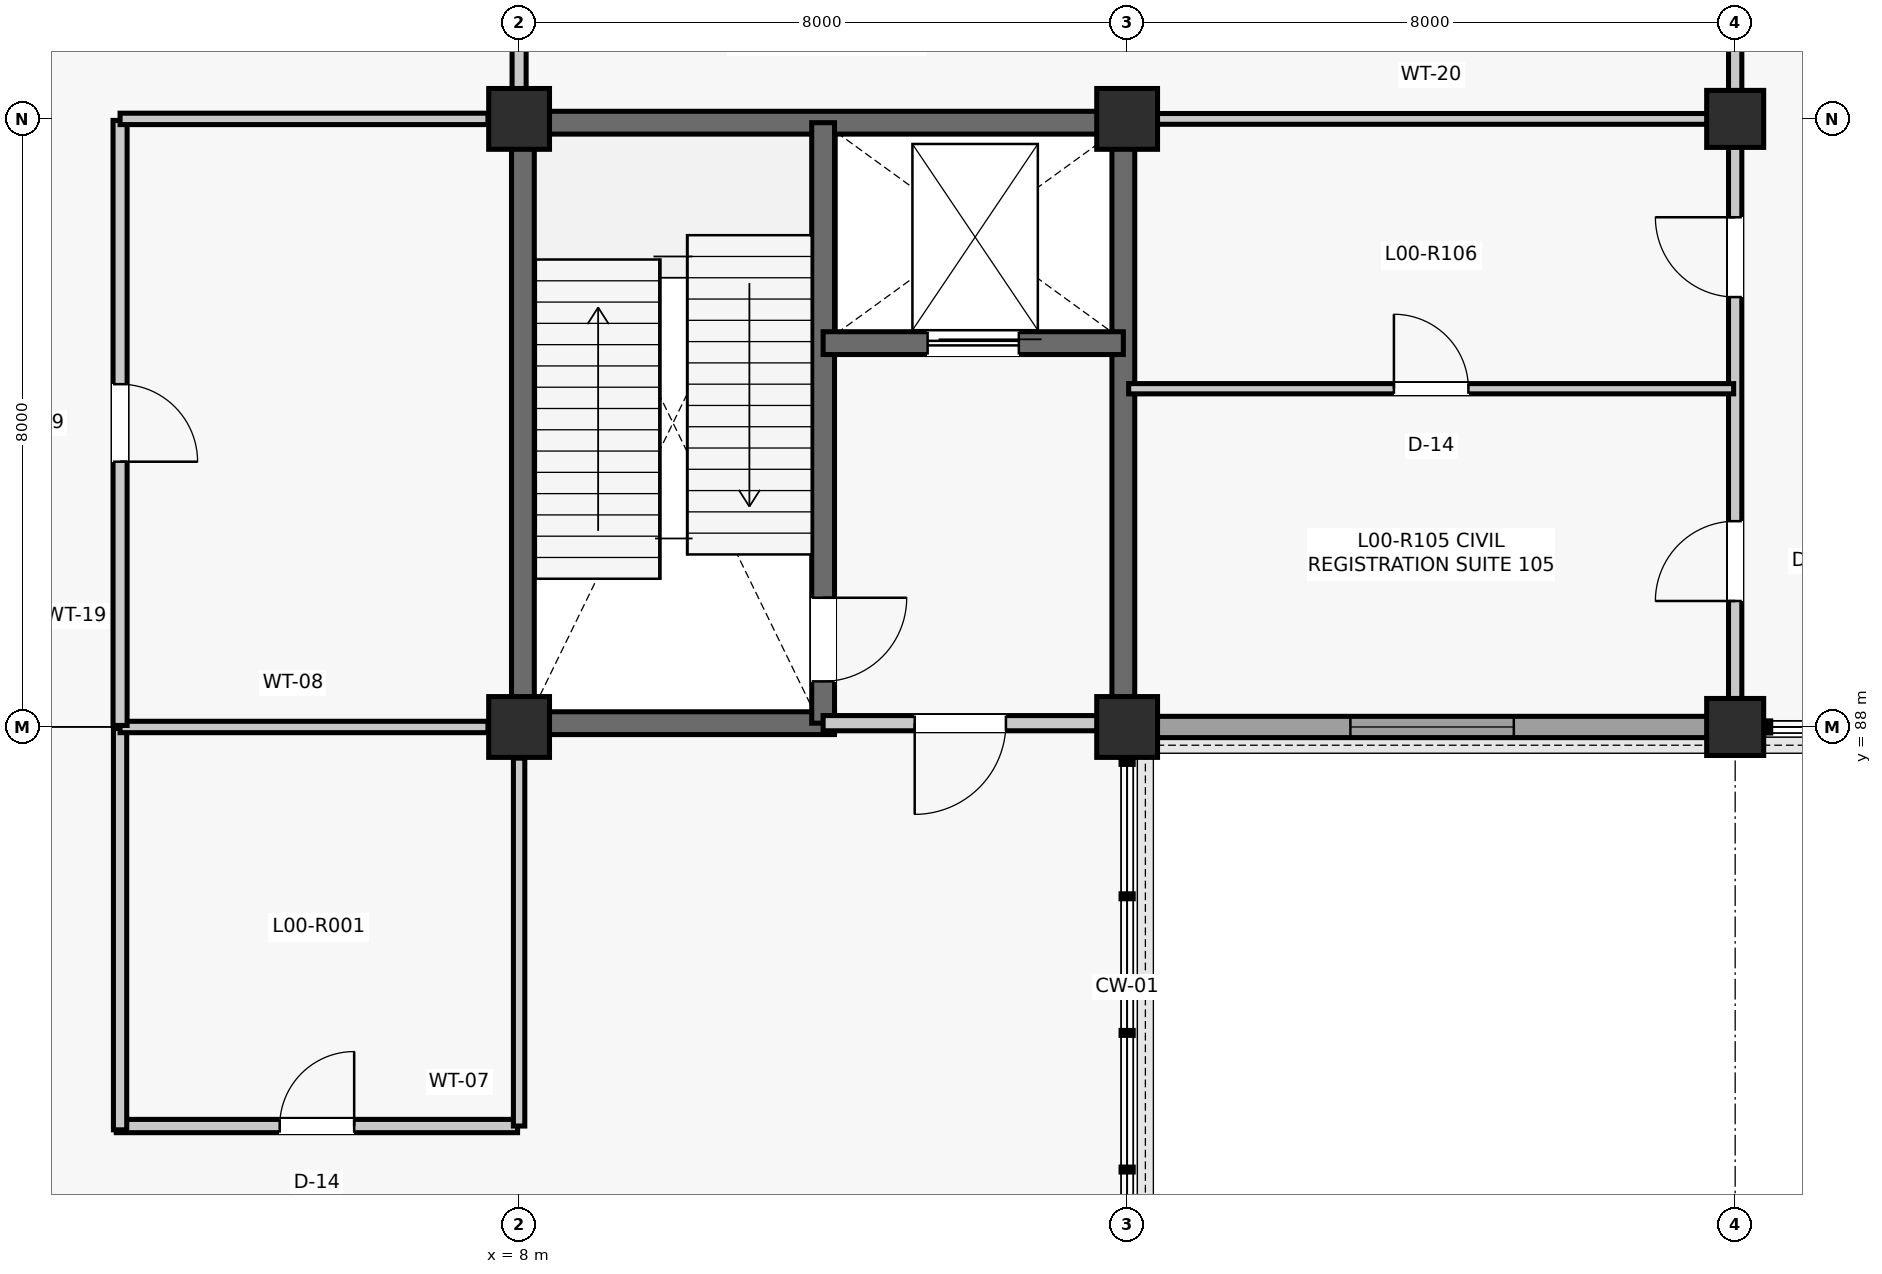
"""IFC4 building model, lengths in metres.
Left out: names, types, materials, properties, quantities, classifications, styles, units other than length and angle.
Written with IfcOpenShell. Run it as: python <this file> out.ifc"""

import sys

from ifc_helpers import new_model, si_unit, direction, frame, frame_2d, origin, origin_2d, place, context, subcontext, project, spatial, rectangle, extrude, element, fill, save


model = new_model("IFC4")
c1 = context("Model", 3, precision=1e-05, world=origin(), true_north=direction((0.0, 1.0)))
c2 = subcontext(c1, "Body", "Model", "MODEL_VIEW")
j1 = project(units=[si_unit("LENGTHUNIT", "METRE"), si_unit("PLANEANGLEUNIT", "RADIAN")], contexts=[c1])
p1 = place(None, origin())
s1 = spatial("IfcSite", under=j1, at=p1, CompositionType="ELEMENT")
p2 = place(p1, origin())
s2 = spatial("IfcBuilding", under=s1, at=p2, CompositionType="ELEMENT")
p3 = place(p2, origin())
s3 = spatial("IfcBuildingStorey", under=s2, at=p3, CompositionType="ELEMENT", Elevation=0.0)
for number, where, z_axis, x_axis in (
    (1, (8.0, 88.0, 0.0), (0.0, 0.0, 1.0), (1.0, 0.0, 0.0)),
    (2, (8.0, 96.0, 0.0), (0.0, 0.0, 1.0), (1.0, 0.0, 0.0)),
    (3, (16.0, 88.0, 0.0), (0.0, 0.0, 1.0), (1.0, 0.0, 0.0)),
    (4, (16.0, 96.0, 0.0), (0.0, 0.0, 1.0), (1.0, 0.0, 0.0)),
):
    element("IfcColumn", number, at=place(p3, frame(where, z_axis=z_axis, x_axis=x_axis)), inside=s3, PredefinedType="COLUMN", context=c2, shape_type="SweptSolid", body=[
        extrude(rectangle(XDim=0.8, YDim=0.8, at=origin_2d()), origin(), (0.0, 0.0, 1.0), 5.28),
    ])
for number, where, z_axis, x_axis in (
    (5, (24.0, 88.0, 0.0), (0.0, 0.0, 1.0), (1.0, 0.0, 0.0)),
    (6, (24.0, 96.0, 0.0), (0.0, 0.0, 1.0), (1.0, 0.0, 0.0)),
):
    element("IfcColumn", number, at=place(p3, frame(where, z_axis=z_axis, x_axis=x_axis)), inside=s3, PredefinedType="COLUMN", context=c2, shape_type="SweptSolid", body=[
        extrude(rectangle(XDim=0.75, YDim=0.75, at=origin_2d()), origin(), (0.0, 0.0, 1.0), 5.28),
    ])
p4 = place(p3, frame((16.385, 88.0, 0.0), z_axis=(0.0, 0.0, 1.0), x_axis=(1.0, 0.0, 0.0)))
e7 = element("IfcWall", 7, at=p4, inside=s3, PredefinedType="SOLIDWALL", context=c2, shape_type="SweptSolid", body=[
    extrude(rectangle(XDim=7.255, YDim=0.28, at=frame_2d((3.627, 0.0))), origin(), (0.0, 0.0, 1.0), 4.674),
])
p5 = place(p4, frame((2.552, 0.0, 0.9)))
e8 = element("IfcOpeningElement", 8, at=p5, cuts=e7, PredefinedType="OPENING", context=c2, shape_type="SweptSolid", body=[
    extrude(rectangle(XDim=2.15, YDim=2.8, at=frame_2d((1.075, 1.4))), frame((0.0, 0.15, 0.0), z_axis=(0.0, -1.0, 0.0), x_axis=(1.0, 0.0, 0.0)), (0.0, 0.0, 1.0), 0.3),
])
for number, where, z_axis, x_axis in (
    (9, (8.05, 88.29, 0.0), (0.0, 0.0, 1.0), (0.0, 1.0, 0.0)),
    (10, (8.29, 95.95, 0.0), (0.0, 0.0, 1.0), (1.0, 0.0, 0.0)),
    (11, (15.95, 88.29, 0.0), (0.0, 0.0, 1.0), (0.0, 1.0, 0.0)),
):
    element("IfcWall", number, at=place(p3, frame(where, z_axis=z_axis, x_axis=x_axis)), inside=s3, PredefinedType="SHEAR", context=c2, shape_type="SweptSolid", body=[
        extrude(rectangle(XDim=7.42, YDim=0.3, at=frame_2d((3.71, 0.0))), origin(), (0.0, 0.0, 1.0), 5.035),
    ])
p6 = place(p3, frame((8.29, 88.05, 0.0), z_axis=(0.0, 0.0, 1.0), x_axis=(1.0, 0.0, 0.0)))
e12 = element("IfcWall", 12, at=p6, inside=s3, PredefinedType="SHEAR", context=c2, shape_type="SweptSolid", body=[
    extrude(rectangle(XDim=3.86, YDim=0.3, at=frame_2d((1.93, 0.0))), origin(), (0.0, 0.0, 1.0), 5.035),
])
p7 = place(p3, frame((12.0, 88.05, 0.0), z_axis=(0.0, 0.0, 1.0), x_axis=(0.0, 1.0, 0.0)))
e13 = element("IfcWall", 13, at=p7, inside=s3, PredefinedType="SHEAR", context=c2, shape_type="SweptSolid", body=[
    extrude(rectangle(XDim=7.9, YDim=0.3, at=frame_2d((3.95, 0.0))), origin(), (0.0, 0.0, 1.0), 5.035),
])
p8 = place(p7, frame((0.55, 0.0, 0.0)))
e14 = element("IfcOpeningElement", 14, at=p8, cuts=e13, PredefinedType="OPENING", context=c2, shape_type="SweptSolid", body=[
    extrude(rectangle(XDim=1.1, YDim=2.15, at=frame_2d((0.55, 1.075))), frame((0.0, 0.16, 0.0), z_axis=(0.0, -1.0, 0.0), x_axis=(1.0, 0.0, 0.0)), (0.0, 0.0, 1.0), 0.32),
])
p9 = place(p3, frame((12.0, 93.05, 0.0), z_axis=(0.0, 0.0, 1.0), x_axis=(1.0, 0.0, 0.0)))
e15 = element("IfcWall", 15, at=p9, inside=s3, PredefinedType="SHEAR", context=c2, shape_type="SweptSolid", body=[
    extrude(rectangle(XDim=3.95, YDim=0.3, at=frame_2d((1.975, 0.0))), origin(), (0.0, 0.0, 1.0), 5.035),
])
p10 = place(p9, frame((1.375, 0.0, 0.0)))
e16 = element("IfcOpeningElement", 16, at=p10, cuts=e15, PredefinedType="OPENING", context=c2, shape_type="SweptSolid", body=[
    extrude(rectangle(XDim=1.2, YDim=2.2, at=frame_2d((0.6, 1.1))), frame((0.0, 0.16, 0.0), z_axis=(0.0, -1.0, 0.0), x_axis=(1.0, 0.0, 0.0)), (0.0, 0.0, 1.0), 0.32),
])
p11 = place(p3, frame((12.0, 88.05, 0.0), z_axis=(0.0, 0.0, 1.0), x_axis=(1.0, 0.0, 0.0)))
e17 = element("IfcWall", 17, at=p11, inside=s3, PredefinedType="PARTITIONING", context=c2, shape_type="SweptSolid", body=[
    extrude(rectangle(XDim=3.61, YDim=0.2, at=frame_2d((1.805, 0.0))), origin(), (0.0, 0.0, 1.0), 4.327),
])
p12 = place(p11, frame((1.205, 0.0, 0.0)))
e18 = element("IfcOpeningElement", 18, at=p12, cuts=e17, PredefinedType="OPENING", context=c2, shape_type="SweptSolid", body=[
    extrude(rectangle(XDim=1.2, YDim=2.15, at=frame_2d((0.6, 1.075))), frame((0.0, 0.11, 0.0), z_axis=(0.0, -1.0, 0.0), x_axis=(1.0, 0.0, 0.0)), (0.0, 0.0, 1.0), 0.22),
])
p13 = place(p3, frame((2.7, 82.75, 0.0), z_axis=(0.0, 0.0, 1.0), x_axis=(1.0, 0.0, 0.0)))
e19 = element("IfcWall", 19, at=p13, inside=s3, PredefinedType="PARTITIONING", context=c2, shape_type="SweptSolid", body=[
    extrude(rectangle(XDim=5.28, YDim=0.175, at=frame_2d((2.64, 0.0))), origin(), (0.0, 0.0, 1.0), 4.471),
])
p14 = place(p13, frame((2.15, 0.0, 0.0)))
e20 = element("IfcOpeningElement", 20, at=p14, cuts=e19, PredefinedType="OPENING", context=c2, shape_type="SweptSolid", body=[
    extrude(rectangle(XDim=0.98, YDim=2.15, at=frame_2d((0.49, 1.075))), frame((0.0, 0.097, 0.0), z_axis=(0.0, -1.0, 0.0), x_axis=(1.0, 0.0, 0.0)), (0.0, 0.0, 1.0), 0.195),
])
p15 = place(p3, frame((2.75, 82.7, 0.0), z_axis=(0.0, 0.0, 1.0), x_axis=(0.0, 1.0, 0.0)))
e21 = element("IfcWall", 21, at=p15, inside=s3, PredefinedType="PARTITIONING", context=c2, shape_type="SweptSolid", body=[
    extrude(rectangle(XDim=5.28, YDim=0.175, at=frame_2d((2.64, 0.0))), origin(), (0.0, 0.0, 1.0), 4.404),
])
p16 = place(p3, frame((2.75, 88.0, 0.0), z_axis=(0.0, 0.0, 1.0), x_axis=(1.0, 0.0, 0.0)))
e22 = element("IfcWall", 22, at=p16, inside=s3, PredefinedType="PARTITIONING", context=c2, shape_type="SweptSolid", body=[
    extrude(rectangle(XDim=4.84, YDim=0.15, at=frame_2d((2.42, 0.0))), origin(), (0.0, 0.0, 1.0), 4.404),
])
p17 = place(p3, frame((8.0, 82.75, 0.0), z_axis=(0.0, 0.0, 1.0), x_axis=(0.0, 1.0, 0.0)))
e23 = element("IfcWall", 23, at=p17, inside=s3, PredefinedType="PARTITIONING", context=c2, shape_type="SweptSolid", body=[
    extrude(rectangle(XDim=4.84, YDim=0.15, at=frame_2d((2.42, 0.0))), origin(), (0.0, 0.0, 1.0), 4.471),
])
p18 = place(p3, frame((2.75, 88.02, 0.0), z_axis=(0.0, 0.0, 1.0), x_axis=(0.0, 1.0, 0.0)))
e24 = element("IfcWall", 24, at=p18, inside=s3, PredefinedType="PARTITIONING", context=c2, shape_type="SweptSolid", body=[
    extrude(rectangle(XDim=7.96, YDim=0.185, at=frame_2d((3.98, 0.0))), origin(), (0.0, 0.0, 1.0), 4.327),
])
p19 = place(p18, frame((3.47, 0.0, 0.0)))
e25 = element("IfcOpeningElement", 25, at=p19, cuts=e24, PredefinedType="OPENING", context=c2, shape_type="SweptSolid", body=[
    extrude(rectangle(XDim=1.02, YDim=2.2, at=frame_2d((0.51, 1.1))), frame((0.0, 0.103, 0.0), z_axis=(0.0, -1.0, 0.0), x_axis=(1.0, 0.0, 0.0)), (0.0, 0.0, 1.0), 0.205),
])
p20 = place(p3, frame((2.75, 96.0, 0.0), z_axis=(0.0, 0.0, 1.0), x_axis=(1.0, 0.0, 0.0)))
e26 = element("IfcWall", 26, at=p20, inside=s3, PredefinedType="PARTITIONING", context=c2, shape_type="SweptSolid", body=[
    extrude(rectangle(XDim=4.84, YDim=0.15, at=frame_2d((2.42, 0.0))), origin(), (0.0, 0.0, 1.0), 4.327),
])
p21 = place(p3, frame((8.0, 96.39, 0.0), z_axis=(0.0, 0.0, 1.0), x_axis=(0.0, 1.0, 0.0)))
e27 = element("IfcWall", 27, at=p21, inside=s3, PredefinedType="PARTITIONING", context=c2, shape_type="SweptSolid", body=[
    extrude(rectangle(XDim=7.245, YDim=0.185, at=frame_2d((3.623, 0.0))), origin(), (0.0, 0.0, 1.0), 4.412),
])
p22 = place(p21, frame((2.972, 0.0, 0.0)))
e28 = element("IfcOpeningElement", 28, at=p22, cuts=e27, PredefinedType="OPENING", context=c2, shape_type="SweptSolid", body=[
    extrude(rectangle(XDim=1.3, YDim=2.2, at=frame_2d((0.65, 1.1))), frame((0.0, 0.103, 0.0), z_axis=(0.0, -1.0, 0.0), x_axis=(1.0, 0.0, 0.0)), (0.0, 0.0, 1.0), 0.205),
])
p23 = place(p3, frame((24.0, 88.365, 0.0), z_axis=(0.0, 0.0, 1.0), x_axis=(0.0, 1.0, 0.0)))
e29 = element("IfcWall", 29, at=p23, inside=s3, PredefinedType="PARTITIONING", context=c2, shape_type="SweptSolid", body=[
    extrude(rectangle(XDim=7.27, YDim=0.175, at=frame_2d((3.635, 0.0))), origin(), (0.0, 0.0, 1.0), 4.404),
])
p24 = place(p23, frame((1.292, 0.0, 0.0)))
e30 = element("IfcOpeningElement", 30, at=p24, cuts=e29, PredefinedType="OPENING", context=c2, shape_type="SweptSolid", body=[
    extrude(rectangle(XDim=1.05, YDim=2.15, at=frame_2d((0.525, 1.075))), frame((0.0, 0.097, 0.0), z_axis=(0.0, -1.0, 0.0), x_axis=(1.0, 0.0, 0.0)), (0.0, 0.0, 1.0), 0.195),
])
p25 = place(p23, frame((5.291, 0.0, 0.0)))
e31 = element("IfcOpeningElement", 31, at=p25, cuts=e29, PredefinedType="OPENING", context=c2, shape_type="SweptSolid", body=[
    extrude(rectangle(XDim=1.05, YDim=2.15, at=frame_2d((0.525, 1.075))), frame((0.0, 0.097, 0.0), z_axis=(0.0, -1.0, 0.0), x_axis=(1.0, 0.0, 0.0)), (0.0, 0.0, 1.0), 0.195),
])
p26 = place(p3, frame((16.39, 96.0, 0.0), z_axis=(0.0, 0.0, 1.0), x_axis=(1.0, 0.0, 0.0)))
e32 = element("IfcWall", 32, at=p26, inside=s3, PredefinedType="PARTITIONING", context=c2, shape_type="SweptSolid", body=[
    extrude(rectangle(XDim=7.245, YDim=0.142, at=frame_2d((3.623, 0.0))), origin(), (0.0, 0.0, 1.0), 4.336),
])
p27 = place(p3, frame((24.0, 96.365, 0.0), z_axis=(0.0, 0.0, 1.0), x_axis=(0.0, 1.0, 0.0)))
e33 = element("IfcWall", 33, at=p27, inside=s3, PredefinedType="PARTITIONING", context=c2, shape_type="SweptSolid", body=[
    extrude(rectangle(XDim=7.27, YDim=0.175, at=frame_2d((3.635, 0.0))), origin(), (0.0, 0.0, 1.0), 4.471),
])
p28 = place(p27, frame((2.685, 0.0, 0.0)))
e34 = element("IfcOpeningElement", 34, at=p28, cuts=e33, PredefinedType="OPENING", context=c2, shape_type="SweptSolid", body=[
    extrude(rectangle(XDim=1.9, YDim=2.38, at=frame_2d((0.95, 1.19))), frame((0.0, 0.097, 0.0), z_axis=(0.0, -1.0, 0.0), x_axis=(1.0, 0.0, 0.0)), (0.0, 0.0, 1.0), 0.195),
])
p29 = place(p3, frame((16.02, 92.45, 0.0), z_axis=(0.0, 0.0, 1.0), x_axis=(1.0, 0.0, 0.0)))
e35 = element("IfcWall", 35, at=p29, inside=s3, PredefinedType="PARTITIONING", context=c2, shape_type="SweptSolid", body=[
    extrude(rectangle(XDim=7.96, YDim=0.135, at=frame_2d((3.98, 0.0))), origin(), (0.0, 0.0, 1.0), 4.404),
])
p30 = place(p29, frame((3.49, 0.0, 0.0)))
e36 = element("IfcOpeningElement", 36, at=p30, cuts=e35, PredefinedType="OPENING", context=c2, shape_type="SweptSolid", body=[
    extrude(rectangle(XDim=0.98, YDim=2.15, at=frame_2d((0.49, 1.075))), frame((0.0, 0.077, 0.0), z_axis=(0.0, -1.0, 0.0), x_axis=(1.0, 0.0, 0.0)), (0.0, 0.0, 1.0), 0.155),
])
p31 = place(p5, origin())
e37 = element("IfcWindow", 37, at=p31, inside=s3, PartitioningType="SINGLE_PANEL", PredefinedType="WINDOW", context=c2, shape_type="SweptSolid", body=[
    extrude(rectangle(XDim=2.15, YDim=2.8, at=frame_2d((1.075, 1.4))), frame((0.0, 0.03, 0.0), z_axis=(0.0, -1.0, 0.0), x_axis=(1.0, 0.0, 0.0)), (0.0, 0.0, 1.0), 0.06),
])
fill(e8, e37)
p32 = place(p8, frame((1.1, 0.0, 0.0), z_axis=(0.0, 0.0, 1.0), x_axis=(-1.0, 0.0, 0.0)))
e38 = element("IfcDoor", 38, at=p32, inside=s3, OperationType="SINGLE_SWING_RIGHT", PredefinedType="DOOR", context=c2, shape_type="SweptSolid", body=[
    extrude(rectangle(XDim=1.1, YDim=2.15, at=frame_2d((0.55, 1.075))), frame((0.0, 0.025, 0.0), z_axis=(0.0, -1.0, 0.0), x_axis=(1.0, 0.0, 0.0)), (0.0, 0.0, 1.0), 0.05),
])
fill(e14, e38)
p33 = place(p10, origin())
e39 = element("IfcDoor", 39, at=p33, inside=s3, OperationType="SLIDING_TO_LEFT", PredefinedType="DOOR", context=c2, shape_type="SweptSolid", body=[
    extrude(rectangle(XDim=1.2, YDim=2.2, at=frame_2d((0.6, 1.1))), frame((0.0, 0.025, 0.0), z_axis=(0.0, -1.0, 0.0), x_axis=(1.0, 0.0, 0.0)), (0.0, 0.0, 1.0), 0.05),
])
fill(e16, e39)
p34 = place(p12, frame((1.2, 0.0, 0.0), z_axis=(0.0, 0.0, 1.0), x_axis=(-1.0, 0.0, 0.0)))
e40 = element("IfcDoor", 40, at=p34, inside=s3, OperationType="SINGLE_SWING_LEFT", PredefinedType="DOOR", context=c2, shape_type="SweptSolid", body=[
    extrude(rectangle(XDim=1.2, YDim=2.15, at=frame_2d((0.6, 1.075))), frame((0.0, 0.025, 0.0), z_axis=(0.0, -1.0, 0.0), x_axis=(1.0, 0.0, 0.0)), (0.0, 0.0, 1.0), 0.05),
])
fill(e18, e40)
p35 = place(p14, origin())
e41 = element("IfcDoor", 41, at=p35, inside=s3, OperationType="SINGLE_SWING_RIGHT", PredefinedType="DOOR", context=c2, shape_type="SweptSolid", body=[
    extrude(rectangle(XDim=0.98, YDim=2.15, at=frame_2d((0.49, 1.075))), frame((0.0, 0.025, 0.0), z_axis=(0.0, -1.0, 0.0), x_axis=(1.0, 0.0, 0.0)), (0.0, 0.0, 1.0), 0.05),
])
fill(e20, e41)
p36 = place(p19, frame((1.02, 0.0, 0.0), z_axis=(0.0, 0.0, 1.0), x_axis=(-1.0, 0.0, 0.0)))
e42 = element("IfcDoor", 42, at=p36, inside=s3, OperationType="SINGLE_SWING_LEFT", PredefinedType="DOOR", context=c2, shape_type="SweptSolid", body=[
    extrude(rectangle(XDim=1.02, YDim=2.2, at=frame_2d((0.51, 1.1))), frame((0.0, 0.025, 0.0), z_axis=(0.0, -1.0, 0.0), x_axis=(1.0, 0.0, 0.0)), (0.0, 0.0, 1.0), 0.05),
])
fill(e25, e42)
p37 = place(p24, origin())
e43 = element("IfcDoor", 43, at=p37, inside=s3, OperationType="SINGLE_SWING_LEFT", PredefinedType="DOOR", context=c2, shape_type="SweptSolid", body=[
    extrude(rectangle(XDim=1.05, YDim=2.15, at=frame_2d((0.525, 1.075))), frame((0.0, 0.025, 0.0), z_axis=(0.0, -1.0, 0.0), x_axis=(1.0, 0.0, 0.0)), (0.0, 0.0, 1.0), 0.05),
])
fill(e30, e43)
p38 = place(p25, origin())
e44 = element("IfcDoor", 44, at=p38, inside=s3, OperationType="SINGLE_SWING_RIGHT", PredefinedType="DOOR", context=c2, shape_type="SweptSolid", body=[
    extrude(rectangle(XDim=1.05, YDim=2.15, at=frame_2d((0.525, 1.075))), frame((0.0, 0.025, 0.0), z_axis=(0.0, -1.0, 0.0), x_axis=(1.0, 0.0, 0.0)), (0.0, 0.0, 1.0), 0.05),
])
fill(e31, e44)
p39 = place(p30, origin())
e45 = element("IfcDoor", 45, at=p39, inside=s3, OperationType="SINGLE_SWING_LEFT", PredefinedType="DOOR", context=c2, shape_type="SweptSolid", body=[
    extrude(rectangle(XDim=0.98, YDim=2.15, at=frame_2d((0.49, 1.075))), frame((0.0, 0.025, 0.0), z_axis=(0.0, -1.0, 0.0), x_axis=(1.0, 0.0, 0.0)), (0.0, 0.0, 1.0), 0.05),
])
fill(e36, e45)
save(model, sys.argv[1])
